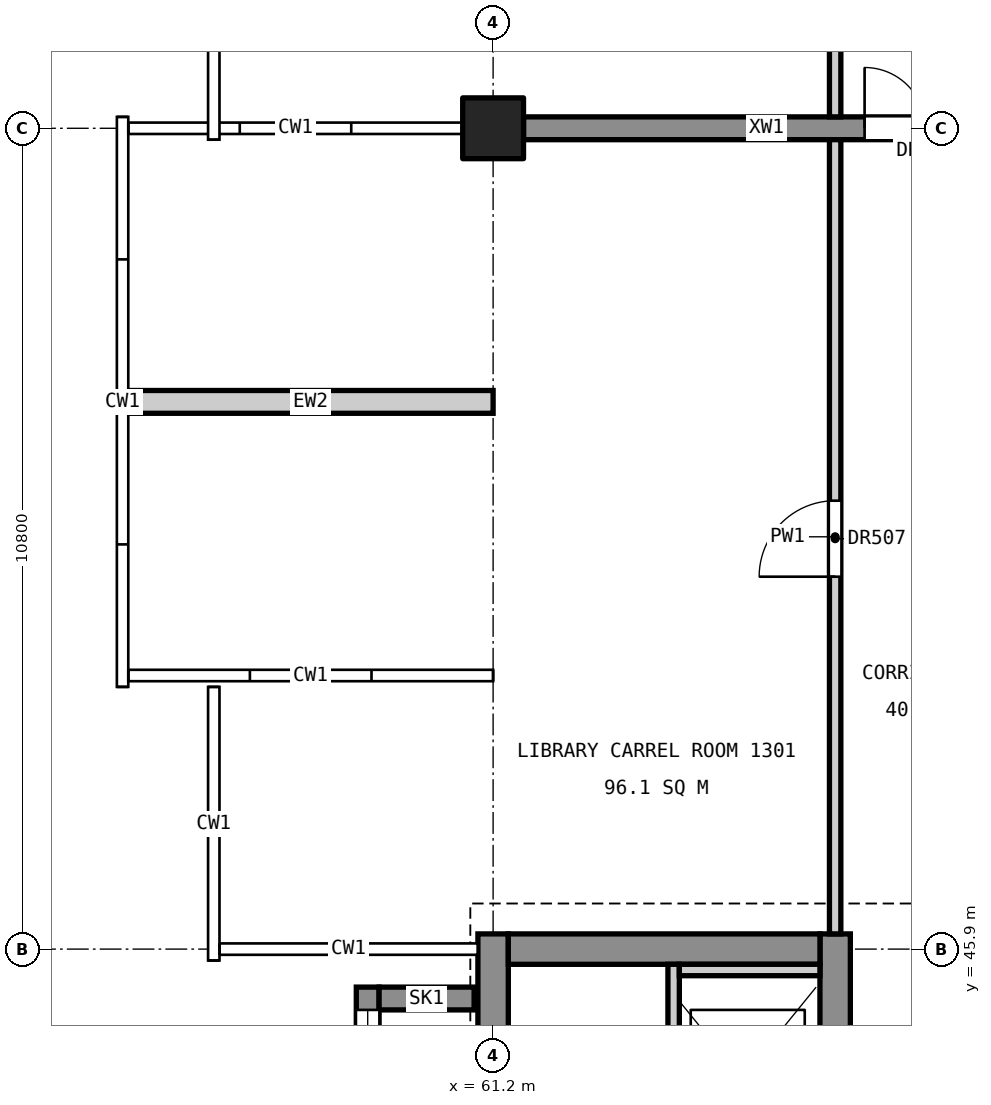
"""IFC4 building model, lengths in metres.
Left out: names, types, materials, properties, quantities, classifications, styles, units other than length and angle.
Written with IfcOpenShell. Run it as: python <this file> out.ifc"""

import sys

from ifc_helpers import new_model, si_unit, direction, frame, frame_2d, origin, origin_2d, place, context, subcontext, project, spatial, rectangle, extrude, element, fill, save


model = new_model("IFC4")
c1 = context("Model", 3, precision=1e-05, world=origin(), true_north=direction((0.0, 1.0)))
c2 = subcontext(c1, "Body", "Model", "MODEL_VIEW")
j1 = project(units=[si_unit("LENGTHUNIT", "METRE"), si_unit("PLANEANGLEUNIT", "RADIAN")], contexts=[c1])
p1 = place(None, origin())
s1 = spatial("IfcSite", under=j1, at=p1, CompositionType="ELEMENT")
p2 = place(p1, origin())
s2 = spatial("IfcBuilding", under=s1, at=p2, CompositionType="ELEMENT")
p3 = place(p2, frame((0.0, 0.0, 65.4)))
s3 = spatial("IfcBuildingStorey", under=s2, at=p3, CompositionType="ELEMENT", Elevation=65.4)
p4 = place(p3, frame((61.2, 56.7, 0.0), z_axis=(0.0, 0.0, 1.0), x_axis=(1.0, 0.0, 0.0)))
e1 = element("IfcColumn", 1, at=p4, inside=s3, PredefinedType="COLUMN", context=c2, shape_type="SweptSolid", body=[
    extrude(rectangle(XDim=0.8, YDim=0.8, at=origin_2d()), origin(), (0.0, 0.0, 1.0), 4.8),
])
p5 = place(p3, frame((61.2, 34.9, 0.0), z_axis=(0.0, 0.0, 1.0), x_axis=(0.0, 1.0, 0.0)))
e2 = element("IfcWall", 2, at=p5, inside=s3, PredefinedType="SHEAR", context=c2, shape_type="SweptSolid", body=[
    extrude(rectangle(XDim=11.2, YDim=0.4, at=frame_2d((5.6, 0.0))), origin(), (0.0, 0.0, 1.0), 4.55),
])
p6 = place(p5, frame((6.11, 0.0, 3.4)))
e3 = element("IfcOpeningElement", 3, at=p6, cuts=e2, PredefinedType="OPENING", context=c2, shape_type="SweptSolid", body=[
    extrude(rectangle(XDim=1.2, YDim=0.9, at=frame_2d((0.6, 0.45))), frame((0.0, 0.21, 0.0), z_axis=(0.0, -1.0, 0.0), x_axis=(1.0, 0.0, 0.0)), (0.0, 0.0, 1.0), 0.42),
])
p7 = place(p3, frame((65.7, 34.9, 0.0), z_axis=(0.0, 0.0, 1.0), x_axis=(0.0, 1.0, 0.0)))
e4 = element("IfcWall", 4, at=p7, inside=s3, PredefinedType="SHEAR", context=c2, shape_type="SweptSolid", body=[
    extrude(rectangle(XDim=11.2, YDim=0.4, at=frame_2d((5.6, 0.0))), origin(), (0.0, 0.0, 1.0), 4.55),
])
p8 = place(p7, frame((0.5, 0.0, 0.0)))
e5 = element("IfcOpeningElement", 5, at=p8, cuts=e4, PredefinedType="OPENING", context=c2, shape_type="SweptSolid", body=[
    extrude(rectangle(XDim=1.4, YDim=2.1, at=frame_2d((0.7, 1.05))), frame((0.0, 0.21, 0.0), z_axis=(0.0, -1.0, 0.0), x_axis=(1.0, 0.0, 0.0)), (0.0, 0.0, 1.0), 0.42),
])
p9 = place(p7, frame((8.75, 0.0, 0.0)))
e6 = element("IfcOpeningElement", 6, at=p9, cuts=e4, PredefinedType="OPENING", context=c2, shape_type="SweptSolid", body=[
    extrude(rectangle(XDim=1.1, YDim=2.1, at=frame_2d((0.55, 1.05))), frame((0.0, 0.21, 0.0), z_axis=(0.0, -1.0, 0.0), x_axis=(1.0, 0.0, 0.0)), (0.0, 0.0, 1.0), 0.42),
])
p10 = place(p3, frame((61.4, 45.9, 0.0), z_axis=(0.0, 0.0, 1.0), x_axis=(1.0, 0.0, 0.0)))
e7 = element("IfcWall", 7, at=p10, inside=s3, PredefinedType="SHEAR", context=c2, shape_type="SweptSolid", body=[
    extrude(rectangle(XDim=4.1, YDim=0.4, at=frame_2d((2.05, 0.0))), origin(), (0.0, 0.0, 1.0), 4.55),
])
p11 = place(p3, frame((59.55, 43.0, 0.0), z_axis=(0.0, 0.0, 1.0), x_axis=(0.0, 1.0, 0.0)))
e8 = element("IfcWall", 8, at=p11, inside=s3, PredefinedType="SHEAR", context=c2, shape_type="SweptSolid", body=[
    extrude(rectangle(XDim=2.4, YDim=0.3, at=frame_2d((1.2, 0.0))), origin(), (0.0, 0.0, 1.0), 4.8),
])
p12 = place(p11, frame((0.3, 0.0, 3.0)))
e9 = element("IfcOpeningElement", 9, at=p12, cuts=e8, PredefinedType="OPENING", context=c2, shape_type="SweptSolid", body=[
    extrude(rectangle(XDim=1.8, YDim=1.2, at=frame_2d((0.9, 0.6))), frame((0.0, 0.16, 0.0), z_axis=(0.0, -1.0, 0.0), x_axis=(1.0, 0.0, 0.0)), (0.0, 0.0, 1.0), 0.32),
])
p13 = place(p3, frame((60.95, 45.25, 0.0), z_axis=(0.0, 0.0, 1.0), x_axis=(-1.0, 0.0, 0.0)))
e10 = element("IfcWall", 10, at=p13, inside=s3, PredefinedType="SHEAR", context=c2, shape_type="SweptSolid", body=[
    extrude(rectangle(XDim=1.25, YDim=0.3, at=frame_2d((0.625, 0.0))), origin(), (0.0, 0.0, 1.0), 4.8),
])
p14 = place(p3, frame((61.6, 56.7, 0.0), z_axis=(0.0, 0.0, 1.0), x_axis=(1.0, 0.0, 0.0)))
e11 = element("IfcWall", 11, at=p14, inside=s3, PredefinedType="SHEAR", context=c2, shape_type="SweptSolid", body=[
    extrude(rectangle(XDim=6.4, YDim=0.3, at=frame_2d((3.2, 0.0))), origin(), (0.0, 0.0, 1.0), 4.55),
])
p15 = place(p14, frame((4.488, 0.0, 0.0)))
e12 = element("IfcOpeningElement", 12, at=p15, cuts=e11, PredefinedType="OPENING", context=c2, shape_type="SweptSolid", body=[
    extrude(rectangle(XDim=1.6, YDim=2.1, at=frame_2d((0.8, 1.05))), frame((0.0, 0.16, 0.0), z_axis=(0.0, -1.0, 0.0), x_axis=(1.0, 0.0, 0.0)), (0.0, 0.0, 1.0), 0.32),
])
p16 = place(p3, frame((63.575, 43.0, 0.0), z_axis=(0.0, 0.0, 1.0), x_axis=(0.0, 1.0, 0.0)))
e13 = element("IfcWall", 13, at=p16, inside=s3, PredefinedType="SOLIDWALL", context=c2, shape_type="SweptSolid", body=[
    extrude(rectangle(XDim=2.7, YDim=0.15, at=frame_2d((1.35, 0.0))), origin(), (0.0, 0.0, 1.0), 4.8),
])
p17 = place(p3, frame((63.65, 45.625, 0.0), z_axis=(0.0, 0.0, 1.0), x_axis=(1.0, 0.0, 0.0)))
e14 = element("IfcWall", 14, at=p17, inside=s3, PredefinedType="SOLIDWALL", context=c2, shape_type="SweptSolid", body=[
    extrude(rectangle(XDim=1.85, YDim=0.15, at=frame_2d((0.925, 0.0))), origin(), (0.0, 0.0, 1.0), 4.8),
])
p18 = place(p3, frame((56.4, 53.1, 0.0), z_axis=(0.0, 0.0, 1.0), x_axis=(1.0, 0.0, 0.0)))
e15 = element("IfcWall", 15, at=p18, inside=s3, PredefinedType="STANDARD", context=c2, shape_type="SweptSolid", body=[
    extrude(rectangle(XDim=4.8, YDim=0.3, at=frame_2d((2.4, 0.0))), origin(), (0.0, 0.0, 1.0), 3.65),
])
p19 = place(p3, frame((65.7, 46.1, 0.0), z_axis=(0.0, 0.0, 1.0), x_axis=(0.0, 1.0, 0.0)))
e16 = element("IfcWall", 16, at=p19, inside=s3, PredefinedType="PARTITIONING", context=c2, shape_type="SweptSolid", body=[
    extrude(rectangle(XDim=10.45, YDim=0.15, at=frame_2d((5.225, 0.0))), origin(), (0.0, 0.0, 1.0), 3.55),
])
p20 = place(p19, frame((4.7, 0.0, 0.0)))
e17 = element("IfcOpeningElement", 17, at=p20, cuts=e16, PredefinedType="OPENING", context=c2, shape_type="SweptSolid", body=[
    extrude(rectangle(XDim=1.0, YDim=2.1, at=frame_2d((0.5, 1.05))), frame((0.0, 0.085, 0.0), z_axis=(0.0, -1.0, 0.0), x_axis=(1.0, 0.0, 0.0)), (0.0, 0.0, 1.0), 0.17),
])
p21 = place(p3, frame((65.7, 56.85, 0.0), z_axis=(0.0, 0.0, 1.0), x_axis=(0.0, 1.0, 0.0)))
e18 = element("IfcWall", 18, at=p21, inside=s3, PredefinedType="PARTITIONING", context=c2, shape_type="SweptSolid", body=[
    extrude(rectangle(XDim=3.25, YDim=0.15, at=frame_2d((1.625, 0.0))), origin(), (0.0, 0.0, 1.0), 3.55),
])
p22 = place(p21, frame((1.15, 0.0, 0.0)))
e19 = element("IfcOpeningElement", 19, at=p22, cuts=e18, PredefinedType="OPENING", context=c2, shape_type="SweptSolid", body=[
    extrude(rectangle(XDim=1.0, YDim=2.1, at=frame_2d((0.5, 1.05))), frame((0.0, 0.085, 0.0), z_axis=(0.0, -1.0, 0.0), x_axis=(1.0, 0.0, 0.0)), (0.0, 0.0, 1.0), 0.17),
])
p23 = place(p12, origin())
e20 = element("IfcWindow", 20, at=p23, inside=s3, PartitioningType="SINGLE_PANEL", PredefinedType="WINDOW", context=c2, shape_type="SweptSolid", body=[
    extrude(rectangle(XDim=1.8, YDim=1.2, at=frame_2d((0.9, 0.6))), frame((0.0, 0.03, 0.0), z_axis=(0.0, -1.0, 0.0), x_axis=(1.0, 0.0, 0.0)), (0.0, 0.0, 1.0), 0.06),
])
fill(e9, e20)
p24 = place(p20, origin())
e21 = element("IfcDoor", 21, at=p24, inside=s3, OperationType="SINGLE_SWING_LEFT", PredefinedType="DOOR", context=c2, shape_type="SweptSolid", body=[
    extrude(rectangle(XDim=1.0, YDim=2.1, at=frame_2d((0.5, 1.05))), frame((0.0, 0.025, 0.0), z_axis=(0.0, -1.0, 0.0), x_axis=(1.0, 0.0, 0.0)), (0.0, 0.0, 1.0), 0.05),
])
fill(e17, e21)
p25 = place(p15, origin())
e22 = element("IfcDoor", 22, at=p25, inside=s3, OperationType="DOUBLE_DOOR_SINGLE_SWING", PredefinedType="DOOR", context=c2, shape_type="SweptSolid", body=[
    extrude(rectangle(XDim=1.6, YDim=2.1, at=frame_2d((0.8, 1.05))), frame((0.0, 0.025, 0.0), z_axis=(0.0, -1.0, 0.0), x_axis=(1.0, 0.0, 0.0)), (0.0, 0.0, 1.0), 0.05),
])
fill(e12, e22)
save(model, sys.argv[1])
